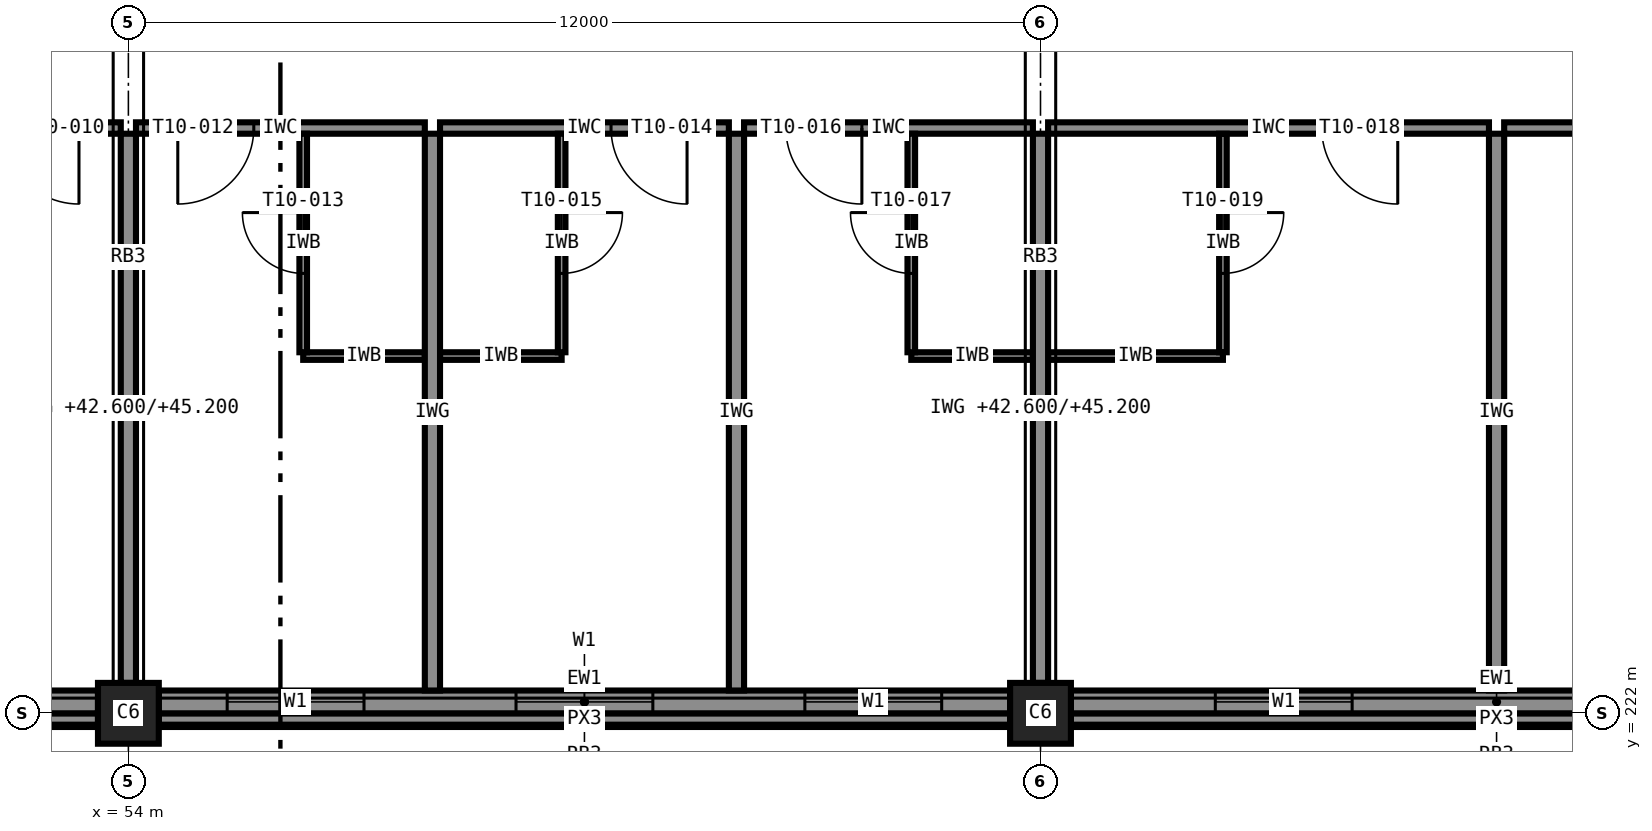
"""IFC4 building model, lengths in metres.
Left out: names, types, materials, properties, quantities, classifications, styles, units other than length and angle.
Written with IfcOpenShell. Run it as: python <this file> out.ifc"""

import sys

from ifc_helpers import new_model, si_unit, direction, frame, frame_2d, origin, origin_2d, place, context, subcontext, project, spatial, rectangle, extrude, element, fill, save


model = new_model("IFC4")
c1 = context("Model", 3, precision=1e-05, world=origin(), true_north=direction((0.0, 1.0)))
c2 = subcontext(c1, "Body", "Model", "MODEL_VIEW")
j1 = project(units=[si_unit("LENGTHUNIT", "METRE"), si_unit("PLANEANGLEUNIT", "RADIAN")], contexts=[c1])
p1 = place(None, origin())
s1 = spatial("IfcSite", under=j1, at=p1, CompositionType="ELEMENT")
p2 = place(p1, origin())
s2 = spatial("IfcBuilding", under=s1, at=p2, CompositionType="ELEMENT")
p3 = place(p2, frame((0.0, 0.0, 42.6)))
s3 = spatial("IfcBuildingStorey", under=s2, at=p3, CompositionType="ELEMENT", Elevation=42.6)
for number, where, z_axis, x_axis in (
    (1, (54.0, 222.0, 0.0), (0.0, 0.0, 1.0), (1.0, 0.0, 0.0)),
    (2, (66.0, 222.0, 0.0), (0.0, 0.0, 1.0), (1.0, 0.0, 0.0)),
):
    element("IfcColumn", number, at=place(p3, frame(where, z_axis=z_axis, x_axis=x_axis)), inside=s3, PredefinedType="COLUMN", context=c2, shape_type="SweptSolid", body=[
        extrude(rectangle(XDim=0.8, YDim=0.8, at=origin_2d()), origin(), (0.0, 0.0, 1.0), 3.6),
    ])
p4 = place(p3, frame((42.4, 222.15, 0.0), z_axis=(0.0, 0.0, 1.0), x_axis=(1.0, 0.0, 0.0)))
e3 = element("IfcWall", 3, at=p4, inside=s3, PredefinedType="STANDARD", context=c2, shape_type="SweptSolid", body=[
    extrude(rectangle(XDim=11.2, YDim=0.3, at=frame_2d((5.6, 0.0))), origin(), (0.0, 0.0, 1.0), 2.6),
])
p5 = place(p4, frame((2.95, 0.0, 0.85)))
e4 = element("IfcOpeningElement", 4, at=p5, cuts=e3, PredefinedType="OPENING", context=c2, shape_type="SweptSolid", body=[
    extrude(rectangle(XDim=1.8, YDim=1.75, at=frame_2d((0.9, 0.875))), frame((0.0, 0.16, 0.0), z_axis=(0.0, -1.0, 0.0), x_axis=(1.0, 0.0, 0.0)), (0.0, 0.0, 1.0), 0.32),
])
p6 = place(p4, frame((8.5, 0.0, 0.85)))
e5 = element("IfcOpeningElement", 5, at=p6, cuts=e3, PredefinedType="OPENING", context=c2, shape_type="SweptSolid", body=[
    extrude(rectangle(XDim=1.8, YDim=1.75, at=frame_2d((0.9, 0.875))), frame((0.0, 0.16, 0.0), z_axis=(0.0, -1.0, 0.0), x_axis=(1.0, 0.0, 0.0)), (0.0, 0.0, 1.0), 0.32),
])
p7 = place(p3, frame((54.4, 222.15, 0.0), z_axis=(0.0, 0.0, 1.0), x_axis=(1.0, 0.0, 0.0)))
e6 = element("IfcWall", 6, at=p7, inside=s3, PredefinedType="STANDARD", context=c2, shape_type="SweptSolid", body=[
    extrude(rectangle(XDim=11.2, YDim=0.3, at=frame_2d((5.6, 0.0))), origin(), (0.0, 0.0, 1.0), 2.6),
])
p8 = place(p7, frame((0.9, 0.0, 0.85)))
e7 = element("IfcOpeningElement", 7, at=p8, cuts=e6, PredefinedType="OPENING", context=c2, shape_type="SweptSolid", body=[
    extrude(rectangle(XDim=1.8, YDim=1.75, at=frame_2d((0.9, 0.875))), frame((0.0, 0.16, 0.0), z_axis=(0.0, -1.0, 0.0), x_axis=(1.0, 0.0, 0.0)), (0.0, 0.0, 1.0), 0.32),
])
p9 = place(p7, frame((4.7, 0.0, 0.85)))
e8 = element("IfcOpeningElement", 8, at=p9, cuts=e6, PredefinedType="OPENING", context=c2, shape_type="SweptSolid", body=[
    extrude(rectangle(XDim=1.8, YDim=1.75, at=frame_2d((0.9, 0.875))), frame((0.0, 0.16, 0.0), z_axis=(0.0, -1.0, 0.0), x_axis=(1.0, 0.0, 0.0)), (0.0, 0.0, 1.0), 0.32),
])
p10 = place(p7, frame((8.5, 0.0, 0.85)))
e9 = element("IfcOpeningElement", 9, at=p10, cuts=e6, PredefinedType="OPENING", context=c2, shape_type="SweptSolid", body=[
    extrude(rectangle(XDim=1.8, YDim=1.75, at=frame_2d((0.9, 0.875))), frame((0.0, 0.16, 0.0), z_axis=(0.0, -1.0, 0.0), x_axis=(1.0, 0.0, 0.0)), (0.0, 0.0, 1.0), 0.32),
])
p11 = place(p3, frame((66.4, 222.15, 0.0), z_axis=(0.0, 0.0, 1.0), x_axis=(1.0, 0.0, 0.0)))
e10 = element("IfcWall", 10, at=p11, inside=s3, PredefinedType="STANDARD", context=c2, shape_type="SweptSolid", body=[
    extrude(rectangle(XDim=11.2, YDim=0.3, at=frame_2d((5.6, 0.0))), origin(), (0.0, 0.0, 1.0), 2.6),
])
p12 = place(p11, frame((1.9, 0.0, 0.85)))
e11 = element("IfcOpeningElement", 11, at=p12, cuts=e10, PredefinedType="OPENING", context=c2, shape_type="SweptSolid", body=[
    extrude(rectangle(XDim=1.8, YDim=1.75, at=frame_2d((0.9, 0.875))), frame((0.0, 0.16, 0.0), z_axis=(0.0, -1.0, 0.0), x_axis=(1.0, 0.0, 0.0)), (0.0, 0.0, 1.0), 0.32),
])
p13 = place(p11, frame((7.5, 0.0, 0.85)))
e12 = element("IfcOpeningElement", 12, at=p13, cuts=e10, PredefinedType="OPENING", context=c2, shape_type="SweptSolid", body=[
    extrude(rectangle(XDim=1.8, YDim=1.75, at=frame_2d((0.9, 0.875))), frame((0.0, 0.16, 0.0), z_axis=(0.0, -1.0, 0.0), x_axis=(1.0, 0.0, 0.0)), (0.0, 0.0, 1.0), 0.32),
])
for number, where, z_axis, x_axis in (
    (13, (42.4, 221.925, 3.4), (0.0, 0.0, 1.0), (1.0, 0.0, 0.0)),
    (14, (54.4, 221.925, 3.4), (0.0, 0.0, 1.0), (1.0, 0.0, 0.0)),
    (15, (66.4, 221.925, 3.4), (0.0, 0.0, 1.0), (1.0, 0.0, 0.0)),
):
    element("IfcWall", number, at=place(p3, frame(where, z_axis=z_axis, x_axis=x_axis)), inside=s3, PredefinedType="STANDARD", context=c2, shape_type="SweptSolid", body=[
        extrude(rectangle(XDim=11.2, YDim=0.15, at=frame_2d((5.6, 0.0))), origin(), (0.0, 0.0, 1.0), 0.2),
    ])
p14 = place(p3, frame((53.9, 229.7, 0.0), z_axis=(0.0, 0.0, 1.0), x_axis=(-1.0, 0.0, 0.0)))
e16 = element("IfcWall", 16, at=p14, inside=s3, PredefinedType="PARTITIONING", context=c2, shape_type="SweptSolid", body=[
    extrude(rectangle(XDim=3.8, YDim=0.15, at=frame_2d((1.9, 0.0))), origin(), (0.0, 0.0, 1.0), 3.4),
])
p15 = place(p14, frame((0.55, 0.0, 0.0)))
e17 = element("IfcOpeningElement", 17, at=p15, cuts=e16, PredefinedType="OPENING", context=c2, shape_type="SweptSolid", body=[
    extrude(rectangle(XDim=1.0, YDim=2.1, at=frame_2d((0.5, 1.05))), frame((0.0, 0.085, 0.0), z_axis=(0.0, -1.0, 0.0), x_axis=(1.0, 0.0, 0.0)), (0.0, 0.0, 1.0), 0.17),
])
p16 = place(p3, frame((57.9, 229.7, 0.0), z_axis=(0.0, 0.0, 1.0), x_axis=(-1.0, 0.0, 0.0)))
e18 = element("IfcWall", 18, at=p16, inside=s3, PredefinedType="PARTITIONING", context=c2, shape_type="SweptSolid", body=[
    extrude(rectangle(XDim=3.8, YDim=0.15, at=frame_2d((1.9, 0.0))), origin(), (0.0, 0.0, 1.0), 3.4),
])
p17 = place(p16, frame((2.25, 0.0, 0.0)))
e19 = element("IfcOpeningElement", 19, at=p17, cuts=e18, PredefinedType="OPENING", context=c2, shape_type="SweptSolid", body=[
    extrude(rectangle(XDim=1.0, YDim=2.1, at=frame_2d((0.5, 1.05))), frame((0.0, 0.085, 0.0), z_axis=(0.0, -1.0, 0.0), x_axis=(1.0, 0.0, 0.0)), (0.0, 0.0, 1.0), 0.17),
])
p18 = place(p3, frame((56.3, 226.7, 0.0), z_axis=(0.0, 0.0, 1.0), x_axis=(1.0, 0.0, 0.0)))
e20 = element("IfcWall", 20, at=p18, inside=s3, PredefinedType="PARTITIONING", context=c2, shape_type="SweptSolid", body=[
    extrude(rectangle(XDim=1.6, YDim=0.1, at=frame_2d((0.8, 0.0))), origin(), (0.0, 0.0, 1.0), 3.4),
])
p19 = place(p3, frame((56.3, 226.75, 0.0), z_axis=(0.0, 0.0, 1.0), x_axis=(0.0, 1.0, 0.0)))
e21 = element("IfcWall", 21, at=p19, inside=s3, PredefinedType="PARTITIONING", context=c2, shape_type="SweptSolid", body=[
    extrude(rectangle(XDim=2.875, YDim=0.1, at=frame_2d((1.438, 0.0))), origin(), (0.0, 0.0, 1.0), 3.4),
])
p20 = place(p19, frame((1.038, 0.0, 0.0)))
e22 = element("IfcOpeningElement", 22, at=p20, cuts=e21, PredefinedType="OPENING", context=c2, shape_type="SweptSolid", body=[
    extrude(rectangle(XDim=0.8, YDim=2.1, at=frame_2d((0.4, 1.05))), frame((0.0, 0.06, 0.0), z_axis=(0.0, -1.0, 0.0), x_axis=(1.0, 0.0, 0.0)), (0.0, 0.0, 1.0), 0.12),
])
p21 = place(p3, frame((61.9, 229.7, 0.0), z_axis=(0.0, 0.0, 1.0), x_axis=(-1.0, 0.0, 0.0)))
e23 = element("IfcWall", 23, at=p21, inside=s3, PredefinedType="PARTITIONING", context=c2, shape_type="SweptSolid", body=[
    extrude(rectangle(XDim=3.8, YDim=0.15, at=frame_2d((1.9, 0.0))), origin(), (0.0, 0.0, 1.0), 3.4),
])
p22 = place(p21, frame((0.55, 0.0, 0.0)))
e24 = element("IfcOpeningElement", 24, at=p22, cuts=e23, PredefinedType="OPENING", context=c2, shape_type="SweptSolid", body=[
    extrude(rectangle(XDim=1.0, YDim=2.1, at=frame_2d((0.5, 1.05))), frame((0.0, 0.085, 0.0), z_axis=(0.0, -1.0, 0.0), x_axis=(1.0, 0.0, 0.0)), (0.0, 0.0, 1.0), 0.17),
])
p23 = place(p3, frame((58.1, 226.7, 0.0), z_axis=(0.0, 0.0, 1.0), x_axis=(1.0, 0.0, 0.0)))
e25 = element("IfcWall", 25, at=p23, inside=s3, PredefinedType="PARTITIONING", context=c2, shape_type="SweptSolid", body=[
    extrude(rectangle(XDim=1.6, YDim=0.1, at=frame_2d((0.8, 0.0))), origin(), (0.0, 0.0, 1.0), 3.4),
])
p24 = place(p3, frame((59.7, 229.625, 0.0), z_axis=(0.0, 0.0, 1.0), x_axis=(0.0, -1.0, 0.0)))
e26 = element("IfcWall", 26, at=p24, inside=s3, PredefinedType="PARTITIONING", context=c2, shape_type="SweptSolid", body=[
    extrude(rectangle(XDim=2.875, YDim=0.1, at=frame_2d((1.438, 0.0))), origin(), (0.0, 0.0, 1.0), 3.4),
])
p25 = place(p24, frame((1.038, 0.0, 0.0)))
e27 = element("IfcOpeningElement", 27, at=p25, cuts=e26, PredefinedType="OPENING", context=c2, shape_type="SweptSolid", body=[
    extrude(rectangle(XDim=0.8, YDim=2.1, at=frame_2d((0.4, 1.05))), frame((0.0, 0.06, 0.0), z_axis=(0.0, -1.0, 0.0), x_axis=(1.0, 0.0, 0.0)), (0.0, 0.0, 1.0), 0.12),
])
p26 = place(p3, frame((65.9, 229.7, 0.0), z_axis=(0.0, 0.0, 1.0), x_axis=(-1.0, 0.0, 0.0)))
e28 = element("IfcWall", 28, at=p26, inside=s3, PredefinedType="PARTITIONING", context=c2, shape_type="SweptSolid", body=[
    extrude(rectangle(XDim=3.8, YDim=0.15, at=frame_2d((1.9, 0.0))), origin(), (0.0, 0.0, 1.0), 3.4),
])
p27 = place(p26, frame((2.25, 0.0, 0.0)))
e29 = element("IfcOpeningElement", 29, at=p27, cuts=e28, PredefinedType="OPENING", context=c2, shape_type="SweptSolid", body=[
    extrude(rectangle(XDim=1.0, YDim=2.1, at=frame_2d((0.5, 1.05))), frame((0.0, 0.085, 0.0), z_axis=(0.0, -1.0, 0.0), x_axis=(1.0, 0.0, 0.0)), (0.0, 0.0, 1.0), 0.17),
])
p28 = place(p3, frame((64.3, 226.7, 0.0), z_axis=(0.0, 0.0, 1.0), x_axis=(1.0, 0.0, 0.0)))
e30 = element("IfcWall", 30, at=p28, inside=s3, PredefinedType="PARTITIONING", context=c2, shape_type="SweptSolid", body=[
    extrude(rectangle(XDim=1.6, YDim=0.1, at=frame_2d((0.8, 0.0))), origin(), (0.0, 0.0, 1.0), 3.4),
])
p29 = place(p3, frame((64.3, 226.75, 0.0), z_axis=(0.0, 0.0, 1.0), x_axis=(0.0, 1.0, 0.0)))
e31 = element("IfcWall", 31, at=p29, inside=s3, PredefinedType="PARTITIONING", context=c2, shape_type="SweptSolid", body=[
    extrude(rectangle(XDim=2.875, YDim=0.1, at=frame_2d((1.438, 0.0))), origin(), (0.0, 0.0, 1.0), 3.4),
])
p30 = place(p29, frame((1.038, 0.0, 0.0)))
e32 = element("IfcOpeningElement", 32, at=p30, cuts=e31, PredefinedType="OPENING", context=c2, shape_type="SweptSolid", body=[
    extrude(rectangle(XDim=0.8, YDim=2.1, at=frame_2d((0.4, 1.05))), frame((0.0, 0.06, 0.0), z_axis=(0.0, -1.0, 0.0), x_axis=(1.0, 0.0, 0.0)), (0.0, 0.0, 1.0), 0.12),
])
p31 = place(p3, frame((71.9, 229.7, 0.0), z_axis=(0.0, 0.0, 1.0), x_axis=(-1.0, 0.0, 0.0)))
e33 = element("IfcWall", 33, at=p31, inside=s3, PredefinedType="PARTITIONING", context=c2, shape_type="SweptSolid", body=[
    extrude(rectangle(XDim=5.8, YDim=0.15, at=frame_2d((2.9, 0.0))), origin(), (0.0, 0.0, 1.0), 3.4),
])
p32 = place(p31, frame((1.2, 0.0, 0.0)))
e34 = element("IfcOpeningElement", 34, at=p32, cuts=e33, PredefinedType="OPENING", context=c2, shape_type="SweptSolid", body=[
    extrude(rectangle(XDim=1.0, YDim=2.1, at=frame_2d((0.5, 1.05))), frame((0.0, 0.085, 0.0), z_axis=(0.0, -1.0, 0.0), x_axis=(1.0, 0.0, 0.0)), (0.0, 0.0, 1.0), 0.17),
])
p33 = place(p3, frame((66.1, 226.7, 0.0), z_axis=(0.0, 0.0, 1.0), x_axis=(1.0, 0.0, 0.0)))
e35 = element("IfcWall", 35, at=p33, inside=s3, PredefinedType="PARTITIONING", context=c2, shape_type="SweptSolid", body=[
    extrude(rectangle(XDim=2.3, YDim=0.1, at=frame_2d((1.15, 0.0))), origin(), (0.0, 0.0, 1.0), 3.4),
])
p34 = place(p3, frame((68.4, 229.625, 0.0), z_axis=(0.0, 0.0, 1.0), x_axis=(0.0, -1.0, 0.0)))
e36 = element("IfcWall", 36, at=p34, inside=s3, PredefinedType="PARTITIONING", context=c2, shape_type="SweptSolid", body=[
    extrude(rectangle(XDim=2.875, YDim=0.1, at=frame_2d((1.438, 0.0))), origin(), (0.0, 0.0, 1.0), 3.4),
])
p35 = place(p34, frame((1.038, 0.0, 0.0)))
e37 = element("IfcOpeningElement", 37, at=p35, cuts=e36, PredefinedType="OPENING", context=c2, shape_type="SweptSolid", body=[
    extrude(rectangle(XDim=0.8, YDim=2.1, at=frame_2d((0.4, 1.05))), frame((0.0, 0.06, 0.0), z_axis=(0.0, -1.0, 0.0), x_axis=(1.0, 0.0, 0.0)), (0.0, 0.0, 1.0), 0.12),
])
p36 = place(p3, frame((77.9, 229.7, 0.0), z_axis=(0.0, 0.0, 1.0), x_axis=(-1.0, 0.0, 0.0)))
e38 = element("IfcWall", 38, at=p36, inside=s3, PredefinedType="PARTITIONING", context=c2, shape_type="SweptSolid", body=[
    extrude(rectangle(XDim=5.8, YDim=0.15, at=frame_2d((2.9, 0.0))), origin(), (0.0, 0.0, 1.0), 3.4),
])
p37 = place(p36, frame((3.6, 0.0, 0.0)))
e39 = element("IfcOpeningElement", 39, at=p37, cuts=e38, PredefinedType="OPENING", context=c2, shape_type="SweptSolid", body=[
    extrude(rectangle(XDim=1.0, YDim=2.1, at=frame_2d((0.5, 1.05))), frame((0.0, 0.085, 0.0), z_axis=(0.0, -1.0, 0.0), x_axis=(1.0, 0.0, 0.0)), (0.0, 0.0, 1.0), 0.17),
])
p38 = place(p3, frame((54.0, 222.4, 0.0), z_axis=(0.0, 0.0, 1.0), x_axis=(0.0, 1.0, 0.0)))
e40 = element("IfcWall", 40, at=p38, inside=s3, PredefinedType="PARTITIONING", context=c2, shape_type="SweptSolid", body=[
    extrude(rectangle(XDim=7.225, YDim=0.2, at=frame_2d((3.613, 0.0))), origin(), (0.0, 0.0, 1.0), 2.6),
])
for number, where, z_axis, x_axis in (
    (41, (58.0, 222.3, 0.0), (0.0, 0.0, 1.0), (0.0, 1.0, 0.0)),
    (42, (62.0, 222.3, 0.0), (0.0, 0.0, 1.0), (0.0, 1.0, 0.0)),
):
    element("IfcWall", number, at=place(p3, frame(where, z_axis=z_axis, x_axis=x_axis)), inside=s3, PredefinedType="PARTITIONING", context=c2, shape_type="SweptSolid", body=[
        extrude(rectangle(XDim=7.325, YDim=0.2, at=frame_2d((3.663, 0.0))), origin(), (0.0, 0.0, 1.0), 3.4),
    ])
p39 = place(p3, frame((66.0, 222.4, 0.0), z_axis=(0.0, 0.0, 1.0), x_axis=(0.0, 1.0, 0.0)))
e43 = element("IfcWall", 43, at=p39, inside=s3, PredefinedType="PARTITIONING", context=c2, shape_type="SweptSolid", body=[
    extrude(rectangle(XDim=7.225, YDim=0.2, at=frame_2d((3.613, 0.0))), origin(), (0.0, 0.0, 1.0), 2.6),
])
p40 = place(p3, frame((72.0, 222.3, 0.0), z_axis=(0.0, 0.0, 1.0), x_axis=(0.0, 1.0, 0.0)))
e44 = element("IfcWall", 44, at=p40, inside=s3, PredefinedType="PARTITIONING", context=c2, shape_type="SweptSolid", body=[
    extrude(rectangle(XDim=7.325, YDim=0.2, at=frame_2d((3.663, 0.0))), origin(), (0.0, 0.0, 1.0), 3.4),
])
p41 = place(p8, origin())
e45 = element("IfcWindow", 45, at=p41, inside=s3, PartitioningType="SINGLE_PANEL", PredefinedType="WINDOW", context=c2, shape_type="SweptSolid", body=[
    extrude(rectangle(XDim=1.8, YDim=1.75, at=frame_2d((0.9, 0.875))), frame((0.0, 0.03, 0.0), z_axis=(0.0, -1.0, 0.0), x_axis=(1.0, 0.0, 0.0)), (0.0, 0.0, 1.0), 0.06),
])
fill(e7, e45)
p42 = place(p9, origin())
e46 = element("IfcWindow", 46, at=p42, inside=s3, PartitioningType="SINGLE_PANEL", PredefinedType="WINDOW", context=c2, shape_type="SweptSolid", body=[
    extrude(rectangle(XDim=1.8, YDim=1.75, at=frame_2d((0.9, 0.875))), frame((0.0, 0.03, 0.0), z_axis=(0.0, -1.0, 0.0), x_axis=(1.0, 0.0, 0.0)), (0.0, 0.0, 1.0), 0.06),
])
fill(e8, e46)
p43 = place(p10, origin())
e47 = element("IfcWindow", 47, at=p43, inside=s3, PartitioningType="SINGLE_PANEL", PredefinedType="WINDOW", context=c2, shape_type="SweptSolid", body=[
    extrude(rectangle(XDim=1.8, YDim=1.75, at=frame_2d((0.9, 0.875))), frame((0.0, 0.03, 0.0), z_axis=(0.0, -1.0, 0.0), x_axis=(1.0, 0.0, 0.0)), (0.0, 0.0, 1.0), 0.06),
])
fill(e9, e47)
p44 = place(p12, origin())
e48 = element("IfcWindow", 48, at=p44, inside=s3, PartitioningType="SINGLE_PANEL", PredefinedType="WINDOW", context=c2, shape_type="SweptSolid", body=[
    extrude(rectangle(XDim=1.8, YDim=1.75, at=frame_2d((0.9, 0.875))), frame((0.0, 0.03, 0.0), z_axis=(0.0, -1.0, 0.0), x_axis=(1.0, 0.0, 0.0)), (0.0, 0.0, 1.0), 0.06),
])
fill(e11, e48)
p45 = place(p15, origin())
e49 = element("IfcDoor", 49, at=p45, inside=s3, OperationType="SINGLE_SWING_LEFT", PredefinedType="DOOR", context=c2, shape_type="SweptSolid", body=[
    extrude(rectangle(XDim=1.0, YDim=2.1, at=frame_2d((0.5, 1.05))), frame((0.0, 0.025, 0.0), z_axis=(0.0, -1.0, 0.0), x_axis=(1.0, 0.0, 0.0)), (0.0, 0.0, 1.0), 0.05),
])
fill(e17, e49)
p46 = place(p17, origin())
e50 = element("IfcDoor", 50, at=p46, inside=s3, OperationType="SINGLE_SWING_RIGHT", PredefinedType="DOOR", context=c2, shape_type="SweptSolid", body=[
    extrude(rectangle(XDim=1.0, YDim=2.1, at=frame_2d((0.5, 1.05))), frame((0.0, 0.025, 0.0), z_axis=(0.0, -1.0, 0.0), x_axis=(1.0, 0.0, 0.0)), (0.0, 0.0, 1.0), 0.05),
])
fill(e19, e50)
p47 = place(p20, origin())
e51 = element("IfcDoor", 51, at=p47, inside=s3, OperationType="SINGLE_SWING_RIGHT", PredefinedType="DOOR", context=c2, shape_type="SweptSolid", body=[
    extrude(rectangle(XDim=0.8, YDim=2.1, at=frame_2d((0.4, 1.05))), frame((0.0, 0.025, 0.0), z_axis=(0.0, -1.0, 0.0), x_axis=(1.0, 0.0, 0.0)), (0.0, 0.0, 1.0), 0.05),
])
fill(e22, e51)
p48 = place(p22, origin())
e52 = element("IfcDoor", 52, at=p48, inside=s3, OperationType="SINGLE_SWING_LEFT", PredefinedType="DOOR", context=c2, shape_type="SweptSolid", body=[
    extrude(rectangle(XDim=1.0, YDim=2.1, at=frame_2d((0.5, 1.05))), frame((0.0, 0.025, 0.0), z_axis=(0.0, -1.0, 0.0), x_axis=(1.0, 0.0, 0.0)), (0.0, 0.0, 1.0), 0.05),
])
fill(e24, e52)
p49 = place(p25, origin())
e53 = element("IfcDoor", 53, at=p49, inside=s3, OperationType="SINGLE_SWING_LEFT", PredefinedType="DOOR", context=c2, shape_type="SweptSolid", body=[
    extrude(rectangle(XDim=0.8, YDim=2.1, at=frame_2d((0.4, 1.05))), frame((0.0, 0.025, 0.0), z_axis=(0.0, -1.0, 0.0), x_axis=(1.0, 0.0, 0.0)), (0.0, 0.0, 1.0), 0.05),
])
fill(e27, e53)
p50 = place(p27, origin())
e54 = element("IfcDoor", 54, at=p50, inside=s3, OperationType="SINGLE_SWING_LEFT", PredefinedType="DOOR", context=c2, shape_type="SweptSolid", body=[
    extrude(rectangle(XDim=1.0, YDim=2.1, at=frame_2d((0.5, 1.05))), frame((0.0, 0.025, 0.0), z_axis=(0.0, -1.0, 0.0), x_axis=(1.0, 0.0, 0.0)), (0.0, 0.0, 1.0), 0.05),
])
fill(e29, e54)
p51 = place(p30, origin())
e55 = element("IfcDoor", 55, at=p51, inside=s3, OperationType="SINGLE_SWING_RIGHT", PredefinedType="DOOR", context=c2, shape_type="SweptSolid", body=[
    extrude(rectangle(XDim=0.8, YDim=2.1, at=frame_2d((0.4, 1.05))), frame((0.0, 0.025, 0.0), z_axis=(0.0, -1.0, 0.0), x_axis=(1.0, 0.0, 0.0)), (0.0, 0.0, 1.0), 0.05),
])
fill(e32, e55)
p52 = place(p32, origin())
e56 = element("IfcDoor", 56, at=p52, inside=s3, OperationType="SINGLE_SWING_LEFT", PredefinedType="DOOR", context=c2, shape_type="SweptSolid", body=[
    extrude(rectangle(XDim=1.0, YDim=2.1, at=frame_2d((0.5, 1.05))), frame((0.0, 0.025, 0.0), z_axis=(0.0, -1.0, 0.0), x_axis=(1.0, 0.0, 0.0)), (0.0, 0.0, 1.0), 0.05),
])
fill(e34, e56)
p53 = place(p35, origin())
e57 = element("IfcDoor", 57, at=p53, inside=s3, OperationType="SINGLE_SWING_LEFT", PredefinedType="DOOR", context=c2, shape_type="SweptSolid", body=[
    extrude(rectangle(XDim=0.8, YDim=2.1, at=frame_2d((0.4, 1.05))), frame((0.0, 0.025, 0.0), z_axis=(0.0, -1.0, 0.0), x_axis=(1.0, 0.0, 0.0)), (0.0, 0.0, 1.0), 0.05),
])
fill(e37, e57)
save(model, sys.argv[1])
